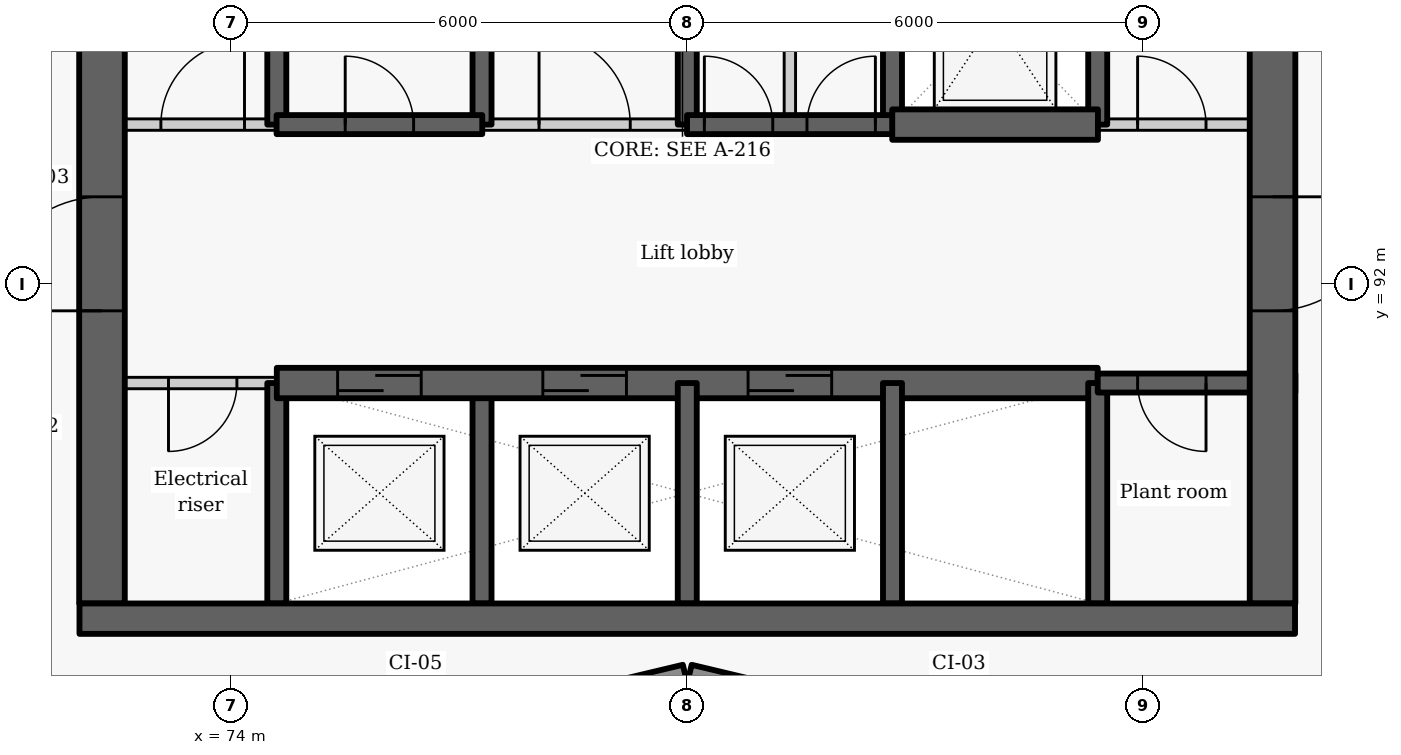
"""IFC4 building model, lengths in metres.
Left out: names, types, materials, properties, quantities, classifications, styles, units other than length and angle.
Written with IfcOpenShell. Run it as: python <this file> out.ifc"""

import sys

from ifc_helpers import new_model, si_unit, direction, frame, frame_2d, origin, place, context, subcontext, project, spatial, rectangle, extrude, element, fill, save


model = new_model("IFC4")
c1 = context("Model", 3, precision=1e-05, world=origin(), true_north=direction((0.0, 1.0)))
c2 = subcontext(c1, "Body", "Model", "MODEL_VIEW")
j1 = project(units=[si_unit("LENGTHUNIT", "METRE"), si_unit("PLANEANGLEUNIT", "RADIAN")], contexts=[c1])
p1 = place(None, origin())
s1 = spatial("IfcSite", under=j1, at=p1, CompositionType="ELEMENT")
p2 = place(p1, origin())
s2 = spatial("IfcBuilding", under=s1, at=p2, CompositionType="ELEMENT")
p3 = place(p2, frame((0.0, 0.0, 77.7)))
s3 = spatial("IfcBuildingStorey", under=s2, at=p3, CompositionType="ELEMENT", Elevation=77.7)
for number, where, z_axis, x_axis in (
    (1, (76.814, 86.119, 0.0), (0.0, 0.0, 1.0), (0.973, 0.232, 0.0)),
    (2, (80.029, 86.872, 0.0), (0.0, 0.0, 1.0), (0.973, -0.232, 0.0)),
):
    element("IfcWall", number, at=place(p3, frame(where, z_axis=z_axis, x_axis=x_axis)), inside=s3, PredefinedType="SOLIDWALL", context=c2, shape_type="SweptSolid", body=[
        extrude(rectangle(XDim=3.246, YDim=0.25, at=frame_2d((1.623, 0.0))), origin(), (0.0, 0.0, 1.0), 2.425),
    ])
p4 = place(p3, frame((74.6, 87.8, -0.41), z_axis=(0.0, 0.0, 1.0), x_axis=(0.0, 1.0, 0.0)))
e3 = element("IfcWall", 3, at=p4, inside=s3, PredefinedType="SHEAR", context=c2, shape_type="SweptSolid", body=[
    extrude(rectangle(XDim=2.9, YDim=0.25, at=frame_2d((1.45, 0.0))), origin(), (0.0, 0.0, 1.0), 3.435),
])
p5 = place(p3, frame((74.6, 94.1, -0.41), z_axis=(0.0, 0.0, 1.0), x_axis=(0.0, 1.0, 0.0)))
e4 = element("IfcWall", 4, at=p5, inside=s3, PredefinedType="SHEAR", context=c2, shape_type="SweptSolid", body=[
    extrude(rectangle(XDim=2.8, YDim=0.25, at=frame_2d((1.4, 0.0))), origin(), (0.0, 0.0, 1.0), 3.435),
])
p6 = place(p3, frame((74.6, 90.7, 0.0), z_axis=(0.0, 0.0, 1.0), x_axis=(-1.0, 0.0, 0.0)))
e5 = element("IfcWall", 5, at=p6, inside=s3, PredefinedType="PARTITIONING", context=c2, shape_type="SweptSolid", body=[
    extrude(rectangle(XDim=2.6, YDim=0.15, at=frame_2d((1.3, 0.0))), origin(), (0.0, 0.0, 1.0), 3.025),
])
p7 = place(p6, frame((0.525, 0.0, 0.0)))
e6 = element("IfcOpeningElement", 6, at=p7, cuts=e5, PredefinedType="OPENING", context=c2, shape_type="SweptSolid", body=[
    extrude(rectangle(XDim=0.9, YDim=2.1, at=frame_2d((0.45, 1.05))), frame((0.0, 0.085, 0.0), z_axis=(0.0, -1.0, 0.0), x_axis=(1.0, 0.0, 0.0)), (0.0, 0.0, 1.0), 0.17),
])
p8 = place(p3, frame((72.3, 87.8, -0.41), z_axis=(0.0, 0.0, 1.0), x_axis=(0.0, 1.0, 0.0)))
e7 = element("IfcWall", 7, at=p8, inside=s3, PredefinedType="SHEAR", context=c2, shape_type="SweptSolid", body=[
    extrude(rectangle(XDim=9.1, YDim=0.6, at=frame_2d((4.55, 0.0))), origin(), (0.0, 0.0, 1.0), 3.435),
])
p9 = place(p8, frame((3.85, 0.0, 0.41)))
e8 = element("IfcOpeningElement", 8, at=p9, cuts=e7, PredefinedType="OPENING", context=c2, shape_type="SweptSolid", body=[
    extrude(rectangle(XDim=1.5, YDim=2.1, at=frame_2d((0.75, 1.05))), frame((0.0, 0.31, 0.0), z_axis=(0.0, -1.0, 0.0), x_axis=(1.0, 0.0, 0.0)), (0.0, 0.0, 1.0), 0.62),
])
p10 = place(p3, frame((77.3, 87.8, -0.41), z_axis=(0.0, 0.0, 1.0), x_axis=(0.0, 1.0, 0.0)))
e9 = element("IfcWall", 9, at=p10, inside=s3, PredefinedType="SHEAR", context=c2, shape_type="SweptSolid", body=[
    extrude(rectangle(XDim=2.9, YDim=0.25, at=frame_2d((1.45, 0.0))), origin(), (0.0, 0.0, 1.0), 3.435),
])
p11 = place(p3, frame((77.3, 94.1, -0.41), z_axis=(0.0, 0.0, 1.0), x_axis=(0.0, 1.0, 0.0)))
e10 = element("IfcWall", 10, at=p11, inside=s3, PredefinedType="SHEAR", context=c2, shape_type="SweptSolid", body=[
    extrude(rectangle(XDim=2.8, YDim=0.25, at=frame_2d((1.4, 0.0))), origin(), (0.0, 0.0, 1.0), 3.435),
])
p12 = place(p3, frame((74.6, 90.7, -0.41), z_axis=(0.0, 0.0, 1.0), x_axis=(1.0, 0.0, 0.0)))
e11 = element("IfcWall", 11, at=p12, inside=s3, PredefinedType="SHEAR", context=c2, shape_type="SweptSolid", body=[
    extrude(rectangle(XDim=10.8, YDim=0.4, at=frame_2d((5.4, 0.0))), origin(), (0.0, 0.0, 1.0), 3.435),
])
p13 = place(p12, frame((0.8, 0.0, 0.41)))
e12 = element("IfcOpeningElement", 12, at=p13, cuts=e11, PredefinedType="OPENING", context=c2, shape_type="SweptSolid", body=[
    extrude(rectangle(XDim=1.1, YDim=2.1, at=frame_2d((0.55, 1.05))), frame((0.0, 0.21, 0.0), z_axis=(0.0, -1.0, 0.0), x_axis=(1.0, 0.0, 0.0)), (0.0, 0.0, 1.0), 0.42),
])
p14 = place(p12, frame((3.5, 0.0, 0.41)))
e13 = element("IfcOpeningElement", 13, at=p14, cuts=e11, PredefinedType="OPENING", context=c2, shape_type="SweptSolid", body=[
    extrude(rectangle(XDim=1.1, YDim=2.1, at=frame_2d((0.55, 1.05))), frame((0.0, 0.21, 0.0), z_axis=(0.0, -1.0, 0.0), x_axis=(1.0, 0.0, 0.0)), (0.0, 0.0, 1.0), 0.42),
])
p15 = place(p12, frame((6.2, 0.0, 0.41)))
e14 = element("IfcOpeningElement", 14, at=p15, cuts=e11, PredefinedType="OPENING", context=c2, shape_type="SweptSolid", body=[
    extrude(rectangle(XDim=1.1, YDim=2.1, at=frame_2d((0.55, 1.05))), frame((0.0, 0.21, 0.0), z_axis=(0.0, -1.0, 0.0), x_axis=(1.0, 0.0, 0.0)), (0.0, 0.0, 1.0), 0.42),
])
p16 = place(p3, frame((80.0, 87.8, -0.41), z_axis=(0.0, 0.0, 1.0), x_axis=(0.0, 1.0, 0.0)))
e15 = element("IfcWall", 15, at=p16, inside=s3, PredefinedType="SHEAR", context=c2, shape_type="SweptSolid", body=[
    extrude(rectangle(XDim=2.9, YDim=0.25, at=frame_2d((1.45, 0.0))), origin(), (0.0, 0.0, 1.0), 3.435),
])
p17 = place(p3, frame((80.0, 94.1, -0.41), z_axis=(0.0, 0.0, 1.0), x_axis=(0.0, 1.0, 0.0)))
e16 = element("IfcWall", 16, at=p17, inside=s3, PredefinedType="SHEAR", context=c2, shape_type="SweptSolid", body=[
    extrude(rectangle(XDim=2.8, YDim=0.25, at=frame_2d((1.4, 0.0))), origin(), (0.0, 0.0, 1.0), 3.435),
])
p18 = place(p3, frame((82.7, 87.8, -0.41), z_axis=(0.0, 0.0, 1.0), x_axis=(0.0, 1.0, 0.0)))
e17 = element("IfcWall", 17, at=p18, inside=s3, PredefinedType="SHEAR", context=c2, shape_type="SweptSolid", body=[
    extrude(rectangle(XDim=2.9, YDim=0.25, at=frame_2d((1.45, 0.0))), origin(), (0.0, 0.0, 1.0), 3.435),
])
p19 = place(p3, frame((82.7, 94.1, -0.41), z_axis=(0.0, 0.0, 1.0), x_axis=(0.0, 1.0, 0.0)))
e18 = element("IfcWall", 18, at=p19, inside=s3, PredefinedType="SHEAR", context=c2, shape_type="SweptSolid", body=[
    extrude(rectangle(XDim=2.8, YDim=0.25, at=frame_2d((1.4, 0.0))), origin(), (0.0, 0.0, 1.0), 3.435),
])
p20 = place(p3, frame((85.4, 87.8, -0.41), z_axis=(0.0, 0.0, 1.0), x_axis=(0.0, 1.0, 0.0)))
e19 = element("IfcWall", 19, at=p20, inside=s3, PredefinedType="SHEAR", context=c2, shape_type="SweptSolid", body=[
    extrude(rectangle(XDim=2.9, YDim=0.25, at=frame_2d((1.45, 0.0))), origin(), (0.0, 0.0, 1.0), 3.435),
])
p21 = place(p3, frame((85.4, 94.1, -0.41), z_axis=(0.0, 0.0, 1.0), x_axis=(0.0, 1.0, 0.0)))
e20 = element("IfcWall", 20, at=p21, inside=s3, PredefinedType="SHEAR", context=c2, shape_type="SweptSolid", body=[
    extrude(rectangle(XDim=2.8, YDim=0.25, at=frame_2d((1.4, 0.0))), origin(), (0.0, 0.0, 1.0), 3.435),
])
p22 = place(p3, frame((88.0, 90.7, -0.41), z_axis=(0.0, 0.0, 1.0), x_axis=(-1.0, 0.0, 0.0)))
e21 = element("IfcWall", 21, at=p22, inside=s3, PredefinedType="SHEAR", context=c2, shape_type="SweptSolid", body=[
    extrude(rectangle(XDim=2.6, YDim=0.25, at=frame_2d((1.3, 0.0))), origin(), (0.0, 0.0, 1.0), 3.435),
])
p23 = place(p22, frame((1.175, 0.0, 0.41)))
e22 = element("IfcOpeningElement", 22, at=p23, cuts=e21, PredefinedType="OPENING", context=c2, shape_type="SweptSolid", body=[
    extrude(rectangle(XDim=0.9, YDim=2.1, at=frame_2d((0.45, 1.05))), frame((0.0, 0.135, 0.0), z_axis=(0.0, -1.0, 0.0), x_axis=(1.0, 0.0, 0.0)), (0.0, 0.0, 1.0), 0.27),
])
p24 = place(p3, frame((87.7, 103.4, -0.41), z_axis=(0.0, 0.0, 1.0), x_axis=(0.0, -1.0, 0.0)))
e23 = element("IfcWall", 23, at=p24, inside=s3, PredefinedType="SHEAR", context=c2, shape_type="SweptSolid", body=[
    extrude(rectangle(XDim=15.6, YDim=0.6, at=frame_2d((7.8, 0.0))), origin(), (0.0, 0.0, 1.0), 3.435),
])
p25 = place(p24, frame((10.25, 0.0, 0.41)))
e24 = element("IfcOpeningElement", 24, at=p25, cuts=e23, PredefinedType="OPENING", context=c2, shape_type="SweptSolid", body=[
    extrude(rectangle(XDim=1.5, YDim=2.1, at=frame_2d((0.75, 1.05))), frame((0.0, 0.31, 0.0), z_axis=(0.0, -1.0, 0.0), x_axis=(1.0, 0.0, 0.0)), (0.0, 0.0, 1.0), 0.62),
])
p26 = place(p24, frame((2.7, 0.0, 0.41)))
e25 = element("IfcOpeningElement", 25, at=p26, cuts=e23, PredefinedType="OPENING", context=c2, shape_type="SweptSolid", body=[
    extrude(rectangle(XDim=1.1, YDim=2.1, at=frame_2d((0.55, 1.05))), frame((0.0, 0.31, 0.0), z_axis=(0.0, -1.0, 0.0), x_axis=(1.0, 0.0, 0.0)), (0.0, 0.0, 1.0), 0.62),
])
p27 = place(p3, frame((72.0, 94.1, 0.0), z_axis=(0.0, 0.0, 1.0), x_axis=(1.0, 0.0, 0.0)))
e26 = element("IfcWall", 26, at=p27, inside=s3, PredefinedType="PARTITIONING", context=c2, shape_type="SweptSolid", body=[
    extrude(rectangle(XDim=2.603, YDim=0.15, at=frame_2d((1.302, 0.0))), origin(), (0.0, 0.0, 1.0), 3.025),
])
p28 = place(p27, frame((1.075, 0.0, 0.0)))
e27 = element("IfcOpeningElement", 27, at=p28, cuts=e26, PredefinedType="OPENING", context=c2, shape_type="SweptSolid", body=[
    extrude(rectangle(XDim=1.1, YDim=2.1, at=frame_2d((0.55, 1.05))), frame((0.0, 0.085, 0.0), z_axis=(0.0, -1.0, 0.0), x_axis=(1.0, 0.0, 0.0)), (0.0, 0.0, 1.0), 0.17),
])
p29 = place(p3, frame((77.297, 94.1, 0.0), z_axis=(0.0, 0.0, 1.0), x_axis=(1.0, 0.0, 0.0)))
e28 = element("IfcWall", 28, at=p29, inside=s3, PredefinedType="PARTITIONING", context=c2, shape_type="SweptSolid", body=[
    extrude(rectangle(XDim=2.706, YDim=0.15, at=frame_2d((1.353, 0.0))), origin(), (0.0, 0.0, 1.0), 3.025),
])
p30 = place(p29, frame((0.753, 0.0, 0.0)))
e29 = element("IfcOpeningElement", 29, at=p30, cuts=e28, PredefinedType="OPENING", context=c2, shape_type="SweptSolid", body=[
    extrude(rectangle(XDim=1.2, YDim=2.1, at=frame_2d((0.6, 1.05))), frame((0.0, 0.085, 0.0), z_axis=(0.0, -1.0, 0.0), x_axis=(1.0, 0.0, 0.0)), (0.0, 0.0, 1.0), 0.17),
])
p31 = place(p3, frame((85.397, 94.1, 0.0), z_axis=(0.0, 0.0, 1.0), x_axis=(1.0, 0.0, 0.0)))
e30 = element("IfcWall", 30, at=p31, inside=s3, PredefinedType="PARTITIONING", context=c2, shape_type="SweptSolid", body=[
    extrude(rectangle(XDim=2.603, YDim=0.15, at=frame_2d((1.302, 0.0))), origin(), (0.0, 0.0, 1.0), 3.025),
])
p32 = place(p31, frame((0.528, 0.0, 0.0)))
e31 = element("IfcOpeningElement", 31, at=p32, cuts=e30, PredefinedType="OPENING", context=c2, shape_type="SweptSolid", body=[
    extrude(rectangle(XDim=0.9, YDim=2.1, at=frame_2d((0.45, 1.05))), frame((0.0, 0.085, 0.0), z_axis=(0.0, -1.0, 0.0), x_axis=(1.0, 0.0, 0.0)), (0.0, 0.0, 1.0), 0.17),
])
p33 = place(p3, frame((74.597, 94.1, -0.41), z_axis=(0.0, 0.0, 1.0), x_axis=(1.0, 0.0, 0.0)))
e32 = element("IfcWall", 32, at=p33, inside=s3, PredefinedType="SHEAR", context=c2, shape_type="SweptSolid", body=[
    extrude(rectangle(XDim=2.706, YDim=0.25, at=frame_2d((1.353, 0.0))), origin(), (0.0, 0.0, 1.0), 3.435),
])
p34 = place(p33, frame((0.903, 0.0, 0.41)))
e33 = element("IfcOpeningElement", 33, at=p34, cuts=e32, PredefinedType="OPENING", context=c2, shape_type="SweptSolid", body=[
    extrude(rectangle(XDim=0.9, YDim=2.1, at=frame_2d((0.45, 1.05))), frame((0.0, 0.135, 0.0), z_axis=(0.0, -1.0, 0.0), x_axis=(1.0, 0.0, 0.0)), (0.0, 0.0, 1.0), 0.27),
])
p35 = place(p3, frame((79.997, 94.1, -0.41), z_axis=(0.0, 0.0, 1.0), x_axis=(1.0, 0.0, 0.0)))
e34 = element("IfcWall", 34, at=p35, inside=s3, PredefinedType="SHEAR", context=c2, shape_type="SweptSolid", body=[
    extrude(rectangle(XDim=2.706, YDim=0.25, at=frame_2d((1.353, 0.0))), origin(), (0.0, 0.0, 1.0), 3.435),
])
p36 = place(p35, frame((0.228, 0.0, 0.41)))
e35 = element("IfcOpeningElement", 35, at=p36, cuts=e34, PredefinedType="OPENING", context=c2, shape_type="SweptSolid", body=[
    extrude(rectangle(XDim=0.9, YDim=2.1, at=frame_2d((0.45, 1.05))), frame((0.0, 0.135, 0.0), z_axis=(0.0, -1.0, 0.0), x_axis=(1.0, 0.0, 0.0)), (0.0, 0.0, 1.0), 0.27),
])
p37 = place(p35, frame((1.578, 0.0, 0.41)))
e36 = element("IfcOpeningElement", 36, at=p37, cuts=e34, PredefinedType="OPENING", context=c2, shape_type="SweptSolid", body=[
    extrude(rectangle(XDim=0.9, YDim=2.1, at=frame_2d((0.45, 1.05))), frame((0.0, 0.135, 0.0), z_axis=(0.0, -1.0, 0.0), x_axis=(1.0, 0.0, 0.0)), (0.0, 0.0, 1.0), 0.27),
])
p38 = place(p3, frame((82.697, 94.1, -0.41), z_axis=(0.0, 0.0, 1.0), x_axis=(1.0, 0.0, 0.0)))
e37 = element("IfcWall", 37, at=p38, inside=s3, PredefinedType="SHEAR", context=c2, shape_type="SweptSolid", body=[
    extrude(rectangle(XDim=2.706, YDim=0.4, at=frame_2d((1.353, 0.0))), origin(), (0.0, 0.0, 1.0), 3.435),
])
p39 = place(p3, frame((81.35, 94.1, 0.0), z_axis=(0.0, 0.0, 1.0), x_axis=(0.0, 1.0, 0.0)))
e38 = element("IfcWall", 38, at=p39, inside=s3, PredefinedType="PARTITIONING", context=c2, shape_type="SweptSolid", body=[
    extrude(rectangle(XDim=2.8, YDim=0.15, at=frame_2d((1.4, 0.0))), origin(), (0.0, 0.0, 1.0), 3.025),
])
p40 = place(p3, frame((72.004, 87.6, -0.41), z_axis=(0.0, 0.0, 1.0), x_axis=(1.0, 0.0, 0.0)))
e39 = element("IfcWall", 39, at=p40, inside=s3, PredefinedType="SHEAR", context=c2, shape_type="SweptSolid", body=[
    extrude(rectangle(XDim=15.992, YDim=0.4, at=frame_2d((7.996, 0.0))), origin(), (0.0, 0.0, 1.0), 3.435),
])
p41 = place(p7, origin())
e40 = element("IfcDoor", 40, at=p41, inside=s3, OperationType="SINGLE_SWING_RIGHT", PredefinedType="DOOR", context=c2, shape_type="SweptSolid", body=[
    extrude(rectangle(XDim=0.9, YDim=2.1, at=frame_2d((0.45, 1.05))), frame((0.0, 0.025, 0.0), z_axis=(0.0, -1.0, 0.0), x_axis=(1.0, 0.0, 0.0)), (0.0, 0.0, 1.0), 0.05),
])
fill(e6, e40)
p42 = place(p13, origin())
e41 = element("IfcDoor", 41, at=p42, inside=s3, OperationType="SLIDING_TO_LEFT", PredefinedType="DOOR", context=c2, shape_type="SweptSolid", body=[
    extrude(rectangle(XDim=1.1, YDim=2.1, at=frame_2d((0.55, 1.05))), frame((0.0, 0.025, 0.0), z_axis=(0.0, -1.0, 0.0), x_axis=(1.0, 0.0, 0.0)), (0.0, 0.0, 1.0), 0.05),
])
fill(e12, e41)
p43 = place(p14, origin())
e42 = element("IfcDoor", 42, at=p43, inside=s3, OperationType="SLIDING_TO_LEFT", PredefinedType="DOOR", context=c2, shape_type="SweptSolid", body=[
    extrude(rectangle(XDim=1.1, YDim=2.1, at=frame_2d((0.55, 1.05))), frame((0.0, 0.025, 0.0), z_axis=(0.0, -1.0, 0.0), x_axis=(1.0, 0.0, 0.0)), (0.0, 0.0, 1.0), 0.05),
])
fill(e13, e42)
p44 = place(p15, origin())
e43 = element("IfcDoor", 43, at=p44, inside=s3, OperationType="SLIDING_TO_LEFT", PredefinedType="DOOR", context=c2, shape_type="SweptSolid", body=[
    extrude(rectangle(XDim=1.1, YDim=2.1, at=frame_2d((0.55, 1.05))), frame((0.0, 0.025, 0.0), z_axis=(0.0, -1.0, 0.0), x_axis=(1.0, 0.0, 0.0)), (0.0, 0.0, 1.0), 0.05),
])
fill(e14, e43)
p45 = place(p23, origin())
e44 = element("IfcDoor", 44, at=p45, inside=s3, OperationType="SINGLE_SWING_LEFT", PredefinedType="DOOR", context=c2, shape_type="SweptSolid", body=[
    extrude(rectangle(XDim=0.9, YDim=2.1, at=frame_2d((0.45, 1.05))), frame((0.0, 0.025, 0.0), z_axis=(0.0, -1.0, 0.0), x_axis=(1.0, 0.0, 0.0)), (0.0, 0.0, 1.0), 0.05),
])
fill(e22, e44)
p46 = place(p28, origin())
e45 = element("IfcDoor", 45, at=p46, inside=s3, OperationType="SINGLE_SWING_RIGHT", PredefinedType="DOOR", context=c2, shape_type="SweptSolid", body=[
    extrude(rectangle(XDim=1.1, YDim=2.1, at=frame_2d((0.55, 1.05))), frame((0.0, 0.025, 0.0), z_axis=(0.0, -1.0, 0.0), x_axis=(1.0, 0.0, 0.0)), (0.0, 0.0, 1.0), 0.05),
])
fill(e27, e45)
p47 = place(p34, origin())
e46 = element("IfcDoor", 46, at=p47, inside=s3, OperationType="SINGLE_SWING_LEFT", PredefinedType="DOOR", context=c2, shape_type="SweptSolid", body=[
    extrude(rectangle(XDim=0.9, YDim=2.1, at=frame_2d((0.45, 1.05))), frame((0.0, 0.025, 0.0), z_axis=(0.0, -1.0, 0.0), x_axis=(1.0, 0.0, 0.0)), (0.0, 0.0, 1.0), 0.05),
])
fill(e33, e46)
p48 = place(p30, origin())
e47 = element("IfcDoor", 47, at=p48, inside=s3, OperationType="DOUBLE_DOOR_SINGLE_SWING", PredefinedType="DOOR", context=c2, shape_type="SweptSolid", body=[
    extrude(rectangle(XDim=1.2, YDim=2.1, at=frame_2d((0.6, 1.05))), frame((0.0, 0.025, 0.0), z_axis=(0.0, -1.0, 0.0), x_axis=(1.0, 0.0, 0.0)), (0.0, 0.0, 1.0), 0.05),
])
fill(e29, e47)
p49 = place(p36, origin())
e48 = element("IfcDoor", 48, at=p49, inside=s3, OperationType="SINGLE_SWING_LEFT", PredefinedType="DOOR", context=c2, shape_type="SweptSolid", body=[
    extrude(rectangle(XDim=0.9, YDim=2.1, at=frame_2d((0.45, 1.05))), frame((0.0, 0.025, 0.0), z_axis=(0.0, -1.0, 0.0), x_axis=(1.0, 0.0, 0.0)), (0.0, 0.0, 1.0), 0.05),
])
fill(e35, e48)
p50 = place(p37, origin())
e49 = element("IfcDoor", 49, at=p50, inside=s3, OperationType="SINGLE_SWING_RIGHT", PredefinedType="DOOR", context=c2, shape_type="SweptSolid", body=[
    extrude(rectangle(XDim=0.9, YDim=2.1, at=frame_2d((0.45, 1.05))), frame((0.0, 0.025, 0.0), z_axis=(0.0, -1.0, 0.0), x_axis=(1.0, 0.0, 0.0)), (0.0, 0.0, 1.0), 0.05),
])
fill(e36, e49)
p51 = place(p32, origin())
e50 = element("IfcDoor", 50, at=p51, inside=s3, OperationType="SINGLE_SWING_LEFT", PredefinedType="DOOR", context=c2, shape_type="SweptSolid", body=[
    extrude(rectangle(XDim=0.9, YDim=2.1, at=frame_2d((0.45, 1.05))), frame((0.0, 0.025, 0.0), z_axis=(0.0, -1.0, 0.0), x_axis=(1.0, 0.0, 0.0)), (0.0, 0.0, 1.0), 0.05),
])
fill(e31, e50)
p52 = place(p25, origin())
e51 = element("IfcDoor", 51, at=p52, inside=s3, OperationType="DOUBLE_DOOR_SINGLE_SWING", PredefinedType="DOOR", context=c2, shape_type="SweptSolid", body=[
    extrude(rectangle(XDim=1.5, YDim=2.1, at=frame_2d((0.75, 1.05))), frame((0.0, 0.025, 0.0), z_axis=(0.0, -1.0, 0.0), x_axis=(1.0, 0.0, 0.0)), (0.0, 0.0, 1.0), 0.05),
])
fill(e24, e51)
p53 = place(p9, origin())
e52 = element("IfcDoor", 52, at=p53, inside=s3, OperationType="DOUBLE_DOOR_SINGLE_SWING", PredefinedType="DOOR", context=c2, shape_type="SweptSolid", body=[
    extrude(rectangle(XDim=1.5, YDim=2.1, at=frame_2d((0.75, 1.05))), frame((0.0, 0.025, 0.0), z_axis=(0.0, -1.0, 0.0), x_axis=(1.0, 0.0, 0.0)), (0.0, 0.0, 1.0), 0.05),
])
fill(e8, e52)
save(model, sys.argv[1])
